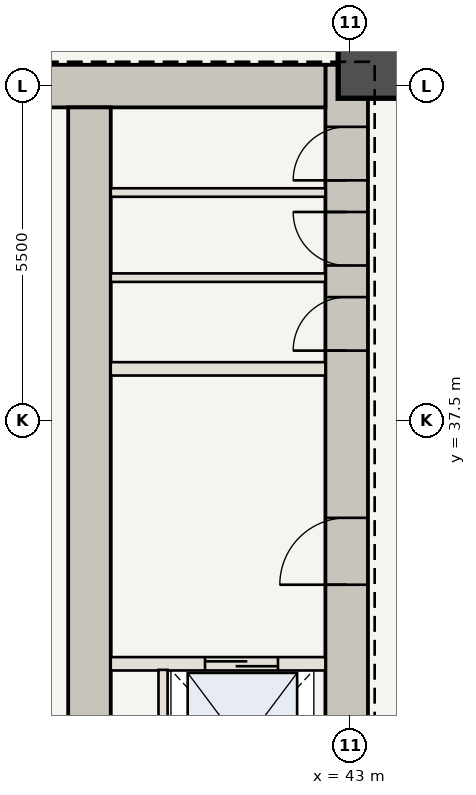
"""IFC4 building model, lengths in metres.
Left out: names, types, materials, properties, quantities, classifications, styles, units other than length and angle.
Written with IfcOpenShell. Run it as: python <this file> out.ifc"""

import sys

from ifc_helpers import new_model, si_unit, direction, frame, frame_2d, origin, origin_2d, place, context, subcontext, project, spatial, rectangle, extrude, element, fill, save


model = new_model("IFC4")
c1 = context("Model", 3, precision=1e-05, world=origin(), true_north=direction((0.0, 1.0)))
c2 = subcontext(c1, "Body", "Model", "MODEL_VIEW")
j1 = project(units=[si_unit("LENGTHUNIT", "METRE"), si_unit("PLANEANGLEUNIT", "RADIAN")], contexts=[c1])
p1 = place(None, origin())
s1 = spatial("IfcSite", under=j1, at=p1, CompositionType="ELEMENT")
p2 = place(p1, origin())
s2 = spatial("IfcBuilding", under=s1, at=p2, CompositionType="ELEMENT")
p3 = place(p2, frame((0.0, 0.0, 49.35)))
s3 = spatial("IfcBuildingStorey", under=s2, at=p3, CompositionType="ELEMENT", Elevation=49.35)
p4 = place(p3, frame((42.94, 30.6, 0.0), z_axis=(0.0, 0.0, 1.0), x_axis=(0.0, 1.0, 0.0)))
e1 = element("IfcWall", 1, at=p4, inside=s3, PredefinedType="SHEAR", context=c2, shape_type="SweptSolid", body=[
    extrude(rectangle(XDim=12.75, YDim=0.7, at=frame_2d((6.375, 0.0))), origin(), (0.0, 0.0, 1.0), 3.5),
])
p5 = place(p4, frame((4.2, 0.0, 0.0)))
e2 = element("IfcOpeningElement", 2, at=p5, cuts=e1, PredefinedType="OPENING", context=c2, shape_type="SweptSolid", body=[
    extrude(rectangle(XDim=1.1, YDim=2.15, at=frame_2d((0.55, 1.075))), frame((0.0, 0.36, 0.0), z_axis=(0.0, -1.0, 0.0), x_axis=(1.0, 0.0, 0.0)), (0.0, 0.0, 1.0), 0.72),
])
p6 = place(p4, frame((8.05, 0.0, 0.0)))
e3 = element("IfcOpeningElement", 3, at=p6, cuts=e1, PredefinedType="OPENING", context=c2, shape_type="SweptSolid", body=[
    extrude(rectangle(XDim=0.88, YDim=2.1, at=frame_2d((0.44, 1.05))), frame((0.0, 0.36, 0.0), z_axis=(0.0, -1.0, 0.0), x_axis=(1.0, 0.0, 0.0)), (0.0, 0.0, 1.0), 0.72),
])
p7 = place(p4, frame((9.45, 0.0, 0.0)))
e4 = element("IfcOpeningElement", 4, at=p7, cuts=e1, PredefinedType="OPENING", context=c2, shape_type="SweptSolid", body=[
    extrude(rectangle(XDim=0.88, YDim=2.1, at=frame_2d((0.44, 1.05))), frame((0.0, 0.36, 0.0), z_axis=(0.0, -1.0, 0.0), x_axis=(1.0, 0.0, 0.0)), (0.0, 0.0, 1.0), 0.72),
])
p8 = place(p4, frame((10.85, 0.0, 0.0)))
e5 = element("IfcOpeningElement", 5, at=p8, cuts=e1, PredefinedType="OPENING", context=c2, shape_type="SweptSolid", body=[
    extrude(rectangle(XDim=0.88, YDim=2.1, at=frame_2d((0.44, 1.05))), frame((0.0, 0.36, 0.0), z_axis=(0.0, -1.0, 0.0), x_axis=(1.0, 0.0, 0.0)), (0.0, 0.0, 1.0), 0.72),
])
p9 = place(p3, frame((37.75, 43.0, 0.0), z_axis=(0.0, 0.0, 1.0), x_axis=(1.0, 0.0, 0.0)))
e6 = element("IfcWall", 6, at=p9, inside=s3, PredefinedType="SHEAR", context=c2, shape_type="SweptSolid", body=[
    extrude(rectangle(XDim=4.84, YDim=0.7, at=frame_2d((2.42, 0.0))), origin(), (0.0, 0.0, 1.0), 3.5),
])
p10 = place(p3, frame((38.71, 30.6, 0.0), z_axis=(0.0, 0.0, 1.0), x_axis=(0.0, 1.0, 0.0)))
e7 = element("IfcWall", 7, at=p10, inside=s3, PredefinedType="SHEAR", context=c2, shape_type="SweptSolid", body=[
    extrude(rectangle(XDim=12.05, YDim=0.7, at=frame_2d((6.025, 0.0))), origin(), (0.0, 0.0, 1.0), 3.5),
])
p11 = place(p3, frame((43.35, 43.35, 0.0), z_axis=(0.0, 0.0, 1.0), x_axis=(1.0, 0.0, 0.0)))
e8 = element("IfcColumn", 8, at=p11, inside=s3, PredefinedType="COLUMN", context=c2, shape_type="SweptSolid", body=[
    extrude(rectangle(XDim=1.1, YDim=1.1, at=origin_2d()), origin(), (0.0, 0.0, 1.0), 3.5),
])
p12 = place(p3, frame((39.06, 33.5, 0.0), z_axis=(0.0, 0.0, 1.0), x_axis=(1.0, 0.0, 0.0)))
e9 = element("IfcWall", 9, at=p12, inside=s3, PredefinedType="STANDARD", context=c2, shape_type="SweptSolid", body=[
    extrude(rectangle(XDim=3.53, YDim=0.22, at=frame_2d((1.765, 0.0))), origin(), (0.0, 0.0, 1.0), 3.32),
])
p13 = place(p12, frame((1.55, 0.0, 0.0)))
e10 = element("IfcOpeningElement", 10, at=p13, cuts=e9, PredefinedType="OPENING", context=c2, shape_type="SweptSolid", body=[
    extrude(rectangle(XDim=1.2, YDim=2.2, at=frame_2d((0.6, 1.1))), frame((0.0, 0.12, 0.0), z_axis=(0.0, -1.0, 0.0), x_axis=(1.0, 0.0, 0.0)), (0.0, 0.0, 1.0), 0.24),
])
p14 = place(p3, frame((39.92, 30.75, 0.0), z_axis=(0.0, 0.0, 1.0), x_axis=(0.0, 1.0, 0.0)))
e11 = element("IfcWall", 11, at=p14, inside=s3, PredefinedType="STANDARD", context=c2, shape_type="SweptSolid", body=[
    extrude(rectangle(XDim=2.65, YDim=0.15, at=frame_2d((1.325, 0.0))), origin(), (0.0, 0.0, 1.0), 3.32),
])
p15 = place(p3, frame((39.06, 38.35, 0.0), z_axis=(0.0, 0.0, 1.0), x_axis=(1.0, 0.0, 0.0)))
e12 = element("IfcWall", 12, at=p15, inside=s3, PredefinedType="STANDARD", context=c2, shape_type="SweptSolid", body=[
    extrude(rectangle(XDim=3.53, YDim=0.22, at=frame_2d((1.765, 0.0))), origin(), (0.0, 0.0, 1.0), 3.32),
])
for number, where, z_axis, x_axis in (
    (13, (39.06, 39.85, 0.0), (0.0, 0.0, 1.0), (1.0, 0.0, 0.0)),
    (14, (39.06, 41.25, 0.0), (0.0, 0.0, 1.0), (1.0, 0.0, 0.0)),
):
    element("IfcWall", number, at=place(p3, frame(where, z_axis=z_axis, x_axis=x_axis)), inside=s3, PredefinedType="STANDARD", context=c2, shape_type="SweptSolid", body=[
        extrude(rectangle(XDim=3.53, YDim=0.14, at=frame_2d((1.765, 0.0))), origin(), (0.0, 0.0, 1.0), 3.32),
    ])
p16 = place(p5, origin())
e15 = element("IfcDoor", 15, at=p16, inside=s3, OperationType="SINGLE_SWING_LEFT", PredefinedType="DOOR", context=c2, shape_type="SweptSolid", body=[
    extrude(rectangle(XDim=1.1, YDim=2.15, at=frame_2d((0.55, 1.075))), frame((0.0, 0.025, 0.0), z_axis=(0.0, -1.0, 0.0), x_axis=(1.0, 0.0, 0.0)), (0.0, 0.0, 1.0), 0.05),
])
fill(e2, e15)
p17 = place(p6, origin())
e16 = element("IfcDoor", 16, at=p17, inside=s3, OperationType="SINGLE_SWING_LEFT", PredefinedType="DOOR", context=c2, shape_type="SweptSolid", body=[
    extrude(rectangle(XDim=0.88, YDim=2.1, at=frame_2d((0.44, 1.05))), frame((0.0, 0.025, 0.0), z_axis=(0.0, -1.0, 0.0), x_axis=(1.0, 0.0, 0.0)), (0.0, 0.0, 1.0), 0.05),
])
fill(e3, e16)
p18 = place(p7, origin())
e17 = element("IfcDoor", 17, at=p18, inside=s3, OperationType="SINGLE_SWING_RIGHT", PredefinedType="DOOR", context=c2, shape_type="SweptSolid", body=[
    extrude(rectangle(XDim=0.88, YDim=2.1, at=frame_2d((0.44, 1.05))), frame((0.0, 0.025, 0.0), z_axis=(0.0, -1.0, 0.0), x_axis=(1.0, 0.0, 0.0)), (0.0, 0.0, 1.0), 0.05),
])
fill(e4, e17)
p19 = place(p8, origin())
e18 = element("IfcDoor", 18, at=p19, inside=s3, OperationType="SINGLE_SWING_LEFT", PredefinedType="DOOR", context=c2, shape_type="SweptSolid", body=[
    extrude(rectangle(XDim=0.88, YDim=2.1, at=frame_2d((0.44, 1.05))), frame((0.0, 0.025, 0.0), z_axis=(0.0, -1.0, 0.0), x_axis=(1.0, 0.0, 0.0)), (0.0, 0.0, 1.0), 0.05),
])
fill(e5, e18)
p20 = place(p13, origin())
e19 = element("IfcDoor", 19, at=p20, inside=s3, OperationType="DOUBLE_DOOR_SLIDING", PredefinedType="DOOR", context=c2, shape_type="SweptSolid", body=[
    extrude(rectangle(XDim=1.2, YDim=2.2, at=frame_2d((0.6, 1.1))), frame((0.0, 0.025, 0.0), z_axis=(0.0, -1.0, 0.0), x_axis=(1.0, 0.0, 0.0)), (0.0, 0.0, 1.0), 0.05),
])
fill(e10, e19)
save(model, sys.argv[1])
